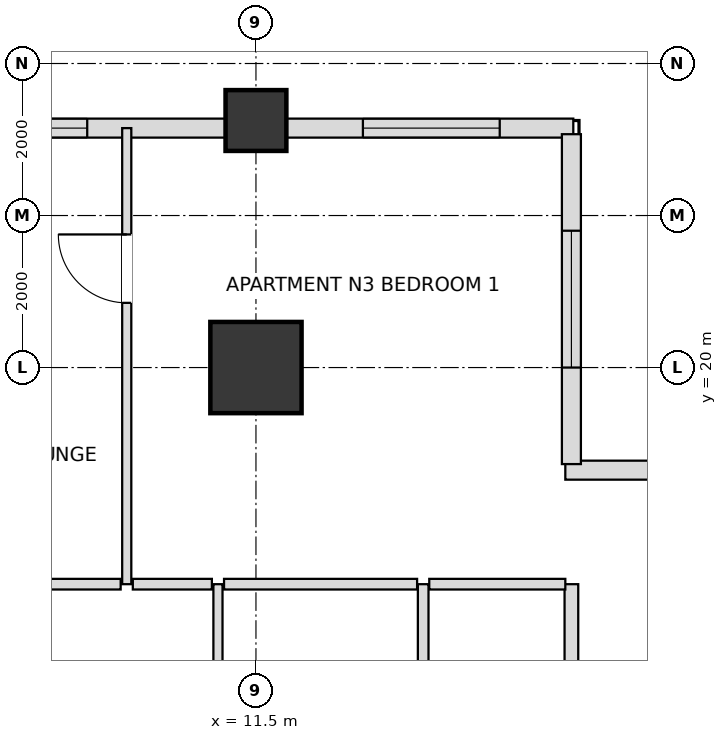
"""IFC4 building model, lengths in metres.
Left out: names, types, materials, properties, quantities, classifications, styles, units other than length and angle.
Written with IfcOpenShell. Run it as: python <this file> out.ifc"""

import sys

from ifc_helpers import new_model, si_unit, direction, frame, frame_2d, origin, origin_2d, place, context, subcontext, project, spatial, rectangle, extrude, element, fill, save


model = new_model("IFC4")
c1 = context("Model", 3, precision=1e-05, world=origin(), true_north=direction((0.0, 1.0)))
c2 = subcontext(c1, "Body", "Model", "MODEL_VIEW")
j1 = project(units=[si_unit("LENGTHUNIT", "METRE"), si_unit("PLANEANGLEUNIT", "RADIAN")], contexts=[c1])
p1 = place(None, origin())
s1 = spatial("IfcSite", under=j1, at=p1, CompositionType="ELEMENT")
p2 = place(p1, origin())
s2 = spatial("IfcBuilding", under=s1, at=p2, CompositionType="ELEMENT")
p3 = place(p2, frame((0.0, 0.0, 106.2)))
s3 = spatial("IfcBuildingStorey", under=s2, at=p3, CompositionType="ELEMENT", Elevation=106.2)
p4 = place(p3, frame((11.5, 20.0, 0.0), z_axis=(0.0, 0.0, 1.0), x_axis=(1.0, 0.0, 0.0)))
e1 = element("IfcColumn", 1, at=p4, inside=s3, PredefinedType="USERDEFINED", context=c2, shape_type="SweptSolid", body=[
    extrude(rectangle(XDim=1.2, YDim=1.2, at=origin_2d()), origin(), (0.0, 0.0, 1.0), 3.6),
])
p5 = place(p3, frame((11.5, 23.25, 0.0), z_axis=(0.0, 0.0, 1.0), x_axis=(1.0, 0.0, 0.0)))
e2 = element("IfcColumn", 2, at=p5, inside=s3, PredefinedType="COLUMN", context=c2, shape_type="SweptSolid", body=[
    extrude(rectangle(XDim=0.8, YDim=0.8, at=origin_2d()), origin(), (0.0, 0.0, 1.0), 3.6),
])
p6 = place(p3, frame((15.675, 23.15, 0.0), z_axis=(0.0, 0.0, 1.0), x_axis=(-1.0, 0.0, 0.0)))
e3 = element("IfcWall", 3, at=p6, inside=s3, PredefinedType="SOLIDWALL", context=c2, shape_type="SweptSolid", body=[
    extrude(rectangle(XDim=3.78, YDim=0.25, at=frame_2d((1.89, 0.0))), origin(), (0.0, 0.0, 1.0), 2.736),
])
p7 = place(p6, frame((0.968, 0.0, 0.72)))
e4 = element("IfcOpeningElement", 4, at=p7, cuts=e3, PredefinedType="OPENING", context=c2, shape_type="SweptSolid", body=[
    extrude(rectangle(XDim=1.8, YDim=1.68, at=frame_2d((0.9, 0.84))), frame((0.0, 0.135, 0.0), z_axis=(0.0, -1.0, 0.0), x_axis=(1.0, 0.0, 0.0)), (0.0, 0.0, 1.0), 0.27),
])
p8 = place(p3, frame((11.105, 23.15, 0.0), z_axis=(0.0, 0.0, 1.0), x_axis=(-1.0, 0.0, 0.0)))
e5 = element("IfcWall", 5, at=p8, inside=s3, PredefinedType="SOLIDWALL", context=c2, shape_type="SweptSolid", body=[
    extrude(rectangle(XDim=4.21, YDim=0.25, at=frame_2d((2.105, 0.0))), origin(), (0.0, 0.0, 1.0), 2.736),
])
p9 = place(p8, frame((1.825, 0.0, 0.72)))
e6 = element("IfcOpeningElement", 6, at=p9, cuts=e5, PredefinedType="OPENING", context=c2, shape_type="SweptSolid", body=[
    extrude(rectangle(XDim=1.8, YDim=1.68, at=frame_2d((0.9, 0.84))), frame((0.0, 0.135, 0.0), z_axis=(0.0, -1.0, 0.0), x_axis=(1.0, 0.0, 0.0)), (0.0, 0.0, 1.0), 0.27),
])
p10 = place(p3, frame((20.23, 18.65, 0.0), z_axis=(0.0, 0.0, 1.0), x_axis=(-1.0, 0.0, 0.0)))
e7 = element("IfcWall", 7, at=p10, inside=s3, PredefinedType="SOLIDWALL", context=c2, shape_type="SweptSolid", body=[
    extrude(rectangle(XDim=4.66, YDim=0.25, at=frame_2d((2.33, 0.0))), origin(), (0.0, 0.0, 1.0), 2.736),
])
p11 = place(p10, frame((1.43, 0.0, 0.72)))
e8 = element("IfcOpeningElement", 8, at=p11, cuts=e7, PredefinedType="OPENING", context=c2, shape_type="SweptSolid", body=[
    extrude(rectangle(XDim=1.8, YDim=1.68, at=frame_2d((0.9, 0.84))), frame((0.0, 0.135, 0.0), z_axis=(0.0, -1.0, 0.0), x_axis=(1.0, 0.0, 0.0)), (0.0, 0.0, 1.0), 0.27),
])
p12 = place(p3, frame((15.65, 18.73, 0.0), z_axis=(0.0, 0.0, 1.0), x_axis=(0.0, 1.0, 0.0)))
e9 = element("IfcWall", 9, at=p12, inside=s3, PredefinedType="SOLIDWALL", context=c2, shape_type="SweptSolid", body=[
    extrude(rectangle(XDim=4.34, YDim=0.25, at=frame_2d((2.17, 0.0))), origin(), (0.0, 0.0, 1.0), 2.736),
])
p13 = place(p12, frame((1.27, 0.0, 0.72)))
e10 = element("IfcOpeningElement", 10, at=p13, cuts=e9, PredefinedType="OPENING", context=c2, shape_type="SweptSolid", body=[
    extrude(rectangle(XDim=1.8, YDim=1.68, at=frame_2d((0.9, 0.84))), frame((0.0, 0.135, 0.0), z_axis=(0.0, -1.0, 0.0), x_axis=(1.0, 0.0, 0.0)), (0.0, 0.0, 1.0), 0.27),
])
p14 = place(p3, frame((9.8, 17.15, 0.0), z_axis=(0.0, 0.0, 1.0), x_axis=(0.0, 1.0, 0.0)))
e11 = element("IfcWall", 11, at=p14, inside=s3, PredefinedType="PARTITIONING", context=c2, shape_type="SweptSolid", body=[
    extrude(rectangle(XDim=6.0, YDim=0.12, at=frame_2d((3.0, 0.0))), origin(), (0.0, 0.0, 1.0), 2.816),
])
p15 = place(p14, frame((3.701, 0.0, 0.0)))
e12 = element("IfcOpeningElement", 12, at=p15, cuts=e11, PredefinedType="OPENING", context=c2, shape_type="SweptSolid", body=[
    extrude(rectangle(XDim=0.9, YDim=2.1, at=frame_2d((0.45, 1.05))), frame((0.0, 0.07, 0.0), z_axis=(0.0, -1.0, 0.0), x_axis=(1.0, 0.0, 0.0)), (0.0, 0.0, 1.0), 0.14),
])
p16 = place(p3, frame((11.0, 9.3, 0.0), z_axis=(0.0, 0.0, 1.0), x_axis=(0.0, 1.0, 0.0)))
e13 = element("IfcWall", 13, at=p16, inside=s3, PredefinedType="PARTITIONING", context=c2, shape_type="SweptSolid", body=[
    extrude(rectangle(XDim=7.85, YDim=0.12, at=frame_2d((3.925, 0.0))), origin(), (0.0, 0.0, 1.0), 2.816),
])
p17 = place(p16, frame((4.219, 0.0, 0.0)))
e14 = element("IfcOpeningElement", 14, at=p17, cuts=e13, PredefinedType="OPENING", context=c2, shape_type="SweptSolid", body=[
    extrude(rectangle(XDim=0.95, YDim=2.1, at=frame_2d((0.475, 1.05))), frame((0.0, 0.07, 0.0), z_axis=(0.0, -1.0, 0.0), x_axis=(1.0, 0.0, 0.0)), (0.0, 0.0, 1.0), 0.14),
])
p18 = place(p3, frame((13.7, 9.3, 0.0), z_axis=(0.0, 0.0, 1.0), x_axis=(0.0, 1.0, 0.0)))
e15 = element("IfcWall", 15, at=p18, inside=s3, PredefinedType="PARTITIONING", context=c2, shape_type="SweptSolid", body=[
    extrude(rectangle(XDim=7.85, YDim=0.14, at=frame_2d((3.925, 0.0))), origin(), (0.0, 0.0, 1.0), 2.736),
])
p19 = place(p18, frame((3.47, 0.0, 0.0)))
e16 = element("IfcOpeningElement", 16, at=p19, cuts=e15, PredefinedType="OPENING", context=c2, shape_type="SweptSolid", body=[
    extrude(rectangle(XDim=0.9, YDim=2.1, at=frame_2d((0.45, 1.05))), frame((0.0, 0.08, 0.0), z_axis=(0.0, -1.0, 0.0), x_axis=(1.0, 0.0, 0.0)), (0.0, 0.0, 1.0), 0.16),
])
p20 = place(p3, frame((15.65, 9.3, 0.0), z_axis=(0.0, 0.0, 1.0), x_axis=(0.0, 1.0, 0.0)))
e17 = element("IfcWall", 17, at=p20, inside=s3, PredefinedType="PARTITIONING", context=c2, shape_type="SweptSolid", body=[
    extrude(rectangle(XDim=7.85, YDim=0.18, at=frame_2d((3.925, 0.0))), origin(), (0.0, 0.0, 1.0), 2.736),
])
p21 = place(p3, frame((5.28, 17.15, 0.0), z_axis=(0.0, 0.0, 1.0), x_axis=(1.0, 0.0, 0.0)))
e18 = element("IfcWall", 18, at=p21, inside=s3, PredefinedType="PARTITIONING", context=c2, shape_type="SweptSolid", body=[
    extrude(rectangle(XDim=4.44, YDim=0.14, at=frame_2d((2.22, 0.0))), origin(), (0.0, 0.0, 1.0), 2.816),
])
p22 = place(p21, frame((1.765, 0.0, 0.0)))
e19 = element("IfcOpeningElement", 19, at=p22, cuts=e18, PredefinedType="OPENING", context=c2, shape_type="SweptSolid", body=[
    extrude(rectangle(XDim=0.95, YDim=2.1, at=frame_2d((0.475, 1.05))), frame((0.0, 0.08, 0.0), z_axis=(0.0, -1.0, 0.0), x_axis=(1.0, 0.0, 0.0)), (0.0, 0.0, 1.0), 0.16),
])
p23 = place(p3, frame((9.88, 17.15, 0.0), z_axis=(0.0, 0.0, 1.0), x_axis=(1.0, 0.0, 0.0)))
e20 = element("IfcWall", 20, at=p23, inside=s3, PredefinedType="PARTITIONING", context=c2, shape_type="SweptSolid", body=[
    extrude(rectangle(XDim=1.04, YDim=0.14, at=frame_2d((0.52, 0.0))), origin(), (0.0, 0.0, 1.0), 3.38),
])
p24 = place(p3, frame((11.08, 17.15, 0.0), z_axis=(0.0, 0.0, 1.0), x_axis=(1.0, 0.0, 0.0)))
e21 = element("IfcWall", 21, at=p24, inside=s3, PredefinedType="PARTITIONING", context=c2, shape_type="SweptSolid", body=[
    extrude(rectangle(XDim=2.54, YDim=0.14, at=frame_2d((1.27, 0.0))), origin(), (0.0, 0.0, 1.0), 2.736),
])
p25 = place(p3, frame((13.78, 17.15, 0.0), z_axis=(0.0, 0.0, 1.0), x_axis=(1.0, 0.0, 0.0)))
e22 = element("IfcWall", 22, at=p25, inside=s3, PredefinedType="PARTITIONING", context=c2, shape_type="SweptSolid", body=[
    extrude(rectangle(XDim=1.79, YDim=0.14, at=frame_2d((0.895, 0.0))), origin(), (0.0, 0.0, 1.0), 2.736),
])
p26 = place(p7, origin())
e23 = element("IfcWindow", 23, at=p26, inside=s3, PartitioningType="SINGLE_PANEL", PredefinedType="WINDOW", context=c2, shape_type="SweptSolid", body=[
    extrude(rectangle(XDim=1.8, YDim=1.68, at=frame_2d((0.9, 0.84))), frame((0.0, 0.03, 0.0), z_axis=(0.0, -1.0, 0.0), x_axis=(1.0, 0.0, 0.0)), (0.0, 0.0, 1.0), 0.06),
])
fill(e4, e23)
p27 = place(p9, origin())
e24 = element("IfcWindow", 24, at=p27, inside=s3, PartitioningType="SINGLE_PANEL", PredefinedType="WINDOW", context=c2, shape_type="SweptSolid", body=[
    extrude(rectangle(XDim=1.8, YDim=1.68, at=frame_2d((0.9, 0.84))), frame((0.0, 0.03, 0.0), z_axis=(0.0, -1.0, 0.0), x_axis=(1.0, 0.0, 0.0)), (0.0, 0.0, 1.0), 0.06),
])
fill(e6, e24)
p28 = place(p13, origin())
e25 = element("IfcWindow", 25, at=p28, inside=s3, PartitioningType="SINGLE_PANEL", PredefinedType="WINDOW", context=c2, shape_type="SweptSolid", body=[
    extrude(rectangle(XDim=1.8, YDim=1.68, at=frame_2d((0.9, 0.84))), frame((0.0, 0.03, 0.0), z_axis=(0.0, -1.0, 0.0), x_axis=(1.0, 0.0, 0.0)), (0.0, 0.0, 1.0), 0.06),
])
fill(e10, e25)
p29 = place(p15, origin())
e26 = element("IfcDoor", 26, at=p29, inside=s3, OperationType="SINGLE_SWING_RIGHT", PredefinedType="DOOR", context=c2, shape_type="SweptSolid", body=[
    extrude(rectangle(XDim=0.9, YDim=2.1, at=frame_2d((0.45, 1.05))), frame((0.0, 0.025, 0.0), z_axis=(0.0, -1.0, 0.0), x_axis=(1.0, 0.0, 0.0)), (0.0, 0.0, 1.0), 0.05),
])
fill(e12, e26)
save(model, sys.argv[1])
